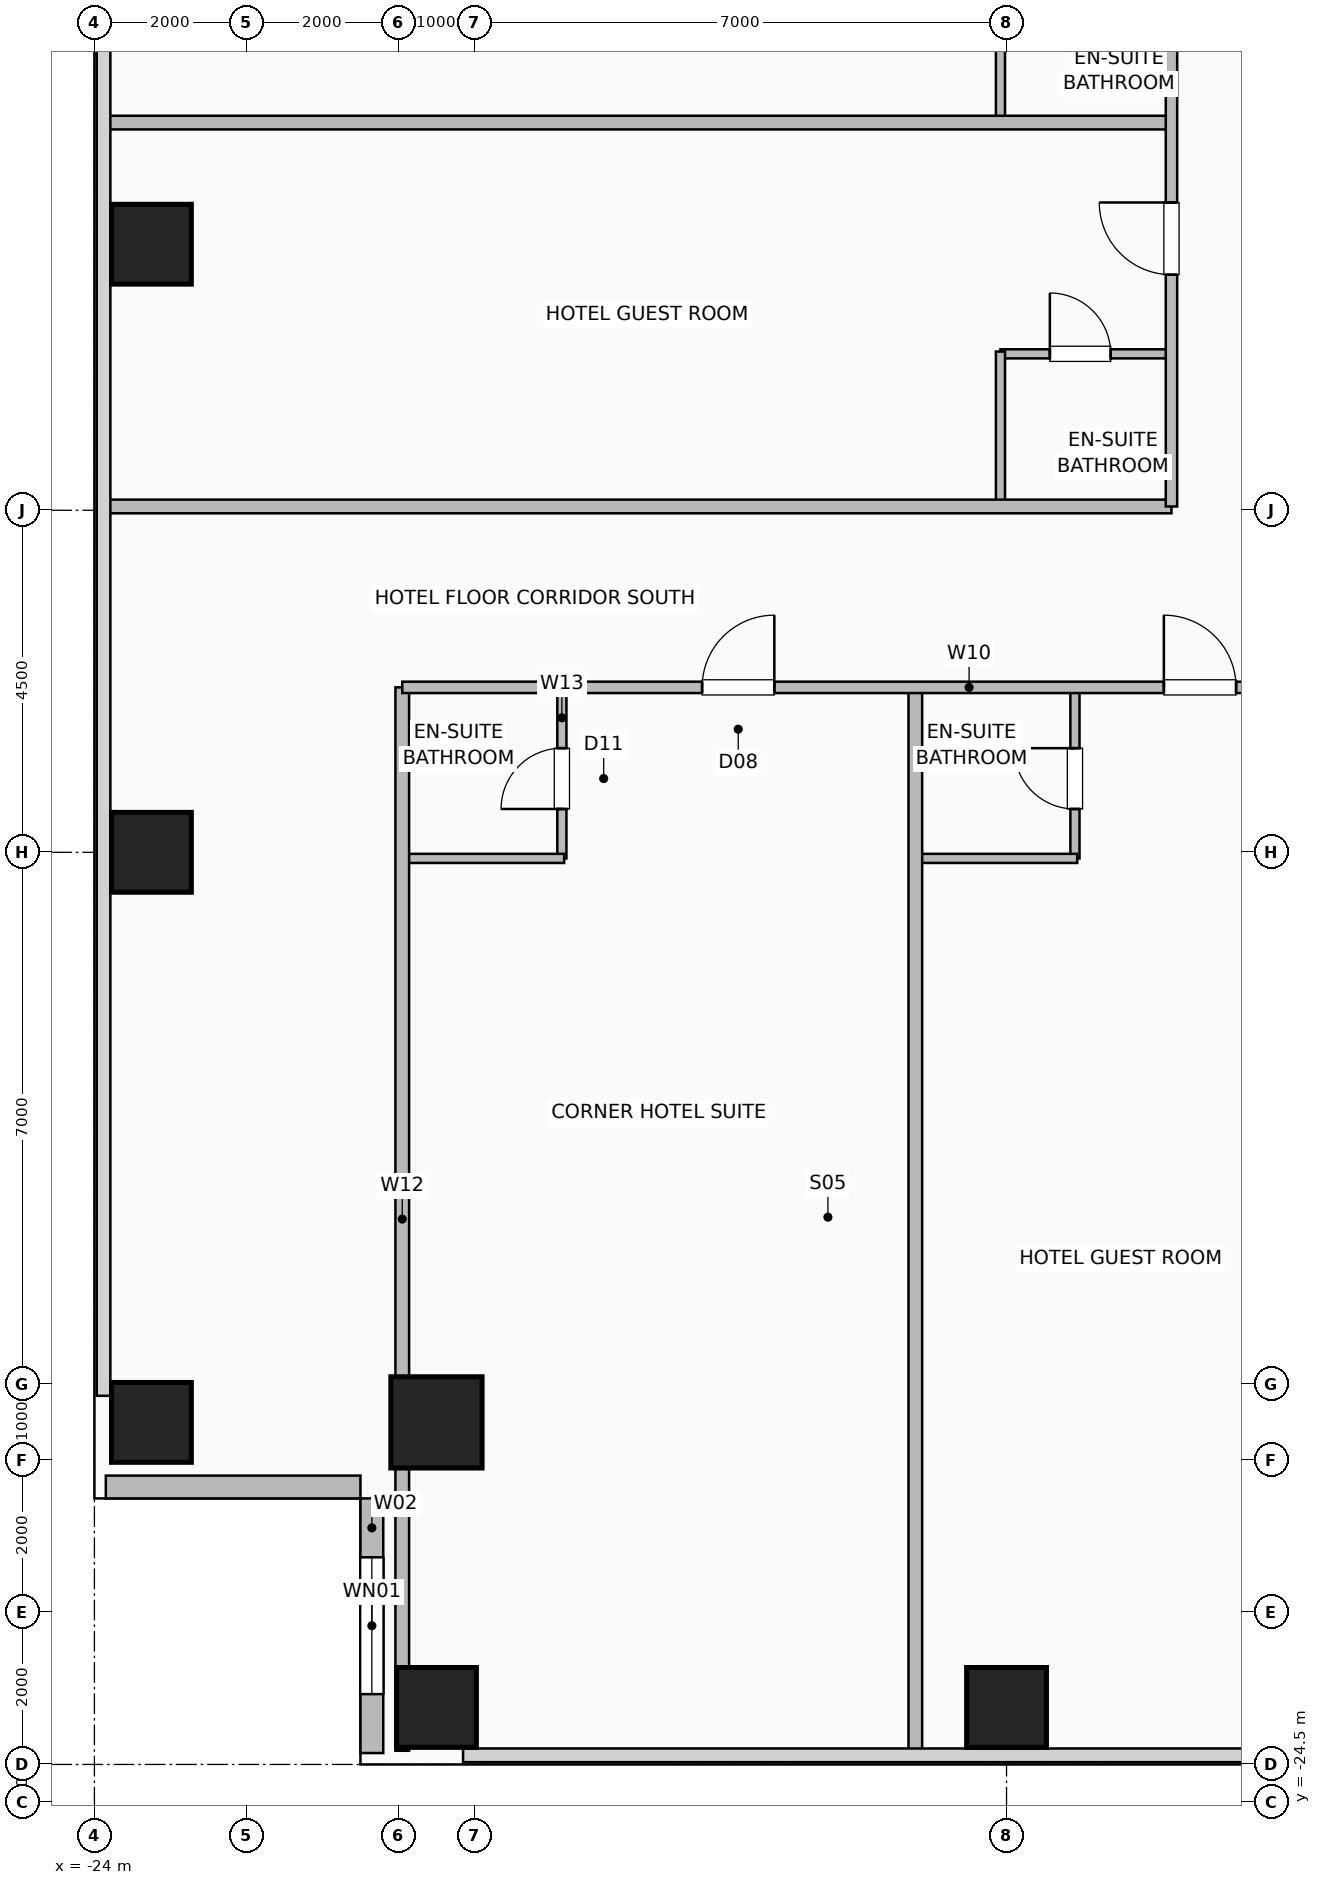
"""IFC4 building model, lengths in metres.
Left out: names, types, materials, properties, quantities, classifications, styles, units other than length and angle.
Written with IfcOpenShell. Run it as: python <this file> out.ifc"""

import sys

from ifc_helpers import new_model, si_unit, direction, frame, frame_2d, origin, origin_2d, place, context, subcontext, project, spatial, rectangle, hollow_rectangle, extrude, element, fill, save


model = new_model("IFC4")
c1 = context("Model", 3, precision=1e-05, world=origin(), true_north=direction((0.0, 1.0)))
c2 = subcontext(c1, "Body", "Model", "MODEL_VIEW")
j1 = project(units=[si_unit("LENGTHUNIT", "METRE"), si_unit("PLANEANGLEUNIT", "RADIAN")], contexts=[c1])
p1 = place(None, origin())
s1 = spatial("IfcSite", under=j1, at=p1, CompositionType="ELEMENT")
p2 = place(p1, origin())
s2 = spatial("IfcBuilding", under=s1, at=p2, CompositionType="ELEMENT")
p3 = place(p2, frame((0.0, 0.0, 30.5)))
s3 = spatial("IfcBuildingStorey", under=s2, at=p3, CompositionType="ELEMENT", Elevation=30.5)
for number, where, z_axis, x_axis in (
    (1, (-19.5, -23.25, 0.0), (0.0, 0.0, 1.0), (1.0, 0.0, 0.0)),
    (2, (-23.25, -19.5, 0.0), (0.0, 0.0, 1.0), (1.0, 0.0, 0.0)),
    (3, (-12.0, -23.25, 0.0), (0.0, 0.0, 1.0), (1.0, 0.0, 0.0)),
    (4, (-23.25, -12.0, 0.0), (0.0, 0.0, 1.0), (1.0, 0.0, 0.0)),
    (5, (-23.25, -4.0, 0.0), (0.0, 0.0, 1.0), (1.0, 0.0, 0.0)),
):
    element("IfcColumn", number, at=place(p3, frame(where, z_axis=z_axis, x_axis=x_axis)), inside=s3, PredefinedType="COLUMN", context=c2, shape_type="SweptSolid", body=[
        extrude(hollow_rectangle(XDim=1.05, YDim=1.05, WallThickness=0.05, at=origin_2d()), origin(), (0.0, 0.0, 1.0), 3.5),
    ])
p4 = place(p3, frame((-19.5, -19.5, 0.0), z_axis=(0.0, 0.0, 1.0), x_axis=(1.0, 0.0, 0.0)))
e6 = element("IfcColumn", 6, at=p4, inside=s3, PredefinedType="COLUMN", context=c2, shape_type="SweptSolid", body=[
    extrude(hollow_rectangle(XDim=1.2, YDim=1.2, WallThickness=0.055, at=origin_2d()), origin(), (0.0, 0.0, 1.0), 3.5),
])
p5 = place(p3, frame((-20.35, -23.85, 0.0), z_axis=(0.0, 0.0, 1.0), x_axis=(0.0, 1.0, 0.0)))
e7 = element("IfcWall", 7, at=p5, inside=s3, PredefinedType="SOLIDWALL", context=c2, shape_type="SweptSolid", body=[
    extrude(rectangle(XDim=3.35, YDim=0.3, at=frame_2d((1.675, 0.0))), origin(), (0.0, 0.0, 1.0), 3.25),
])
p6 = place(p5, frame((0.775, 0.0, 0.9)))
e8 = element("IfcOpeningElement", 8, at=p6, cuts=e7, PredefinedType="OPENING", context=c2, shape_type="SweptSolid", body=[
    extrude(rectangle(XDim=1.8, YDim=1.8, at=frame_2d((0.9, 0.9))), frame((0.0, 0.16, 0.0), z_axis=(0.0, -1.0, 0.0), x_axis=(1.0, 0.0, 0.0)), (0.0, 0.0, 1.0), 0.32),
])
p7 = place(p3, frame((-23.85, -20.35, 0.0), z_axis=(0.0, 0.0, 1.0), x_axis=(1.0, 0.0, 0.0)))
e9 = element("IfcWall", 9, at=p7, inside=s3, PredefinedType="SOLIDWALL", context=c2, shape_type="SweptSolid", body=[
    extrude(rectangle(XDim=3.35, YDim=0.3, at=frame_2d((1.675, 0.0))), origin(), (0.0, 0.0, 1.0), 3.25),
])
p8 = place(p3, frame((-17.85, -12.08, 0.0), z_axis=(0.0, 0.0, 1.0), x_axis=(0.0, 1.0, 0.0)))
e10 = element("IfcWall", 10, at=p8, inside=s3, PredefinedType="PLUMBINGWALL", context=c2, shape_type="SweptSolid", body=[
    extrude(rectangle(XDim=2.25, YDim=0.12, at=frame_2d((1.125, 0.0))), origin(), (0.0, 0.0, 1.0), 3.25),
])
p9 = place(p8, frame((0.65, 0.0, 0.0)))
e11 = element("IfcOpeningElement", 11, at=p9, cuts=e10, PredefinedType="OPENING", context=c2, shape_type="SweptSolid", body=[
    extrude(rectangle(XDim=0.8, YDim=2.05, at=frame_2d((0.4, 1.025))), frame((0.0, 0.07, 0.0), z_axis=(0.0, -1.0, 0.0), x_axis=(1.0, 0.0, 0.0)), (0.0, 0.0, 1.0), 0.14),
])
p10 = place(p3, frame((-19.92, -12.08, 0.0), z_axis=(0.0, 0.0, 1.0), x_axis=(1.0, 0.0, 0.0)))
e12 = element("IfcWall", 12, at=p10, inside=s3, PredefinedType="PLUMBINGWALL", context=c2, shape_type="SweptSolid", body=[
    extrude(rectangle(XDim=2.1, YDim=0.12, at=frame_2d((1.05, 0.0))), origin(), (0.0, 0.0, 1.0), 3.25),
])
p11 = place(p3, frame((-11.1, -12.08, 0.0), z_axis=(0.0, 0.0, 1.0), x_axis=(0.0, 1.0, 0.0)))
e13 = element("IfcWall", 13, at=p11, inside=s3, PredefinedType="PLUMBINGWALL", context=c2, shape_type="SweptSolid", body=[
    extrude(rectangle(XDim=2.25, YDim=0.12, at=frame_2d((1.125, 0.0))), origin(), (0.0, 0.0, 1.0), 3.25),
])
p12 = place(p11, frame((0.65, 0.0, 0.0)))
e14 = element("IfcOpeningElement", 14, at=p12, cuts=e13, PredefinedType="OPENING", context=c2, shape_type="SweptSolid", body=[
    extrude(rectangle(XDim=0.8, YDim=2.05, at=frame_2d((0.4, 1.025))), frame((0.0, 0.07, 0.0), z_axis=(0.0, -1.0, 0.0), x_axis=(1.0, 0.0, 0.0)), (0.0, 0.0, 1.0), 0.14),
])
p13 = place(p3, frame((-13.17, -12.08, 0.0), z_axis=(0.0, 0.0, 1.0), x_axis=(1.0, 0.0, 0.0)))
e15 = element("IfcWall", 15, at=p13, inside=s3, PredefinedType="PLUMBINGWALL", context=c2, shape_type="SweptSolid", body=[
    extrude(rectangle(XDim=2.1, YDim=0.12, at=frame_2d((1.05, 0.0))), origin(), (0.0, 0.0, 1.0), 3.25),
])
for number, where, z_axis, x_axis in (
    (16, (-19.95, -23.82, 0.0), (0.0, 0.0, 1.0), (0.0, 1.0, 0.0)),
    (17, (-13.2, -23.82, 0.0), (0.0, 0.0, 1.0), (0.0, 1.0, 0.0)),
):
    element("IfcWall", number, at=place(p3, frame(where, z_axis=z_axis, x_axis=x_axis)), inside=s3, PredefinedType="PARTITIONING", context=c2, shape_type="SweptSolid", body=[
        extrude(rectangle(XDim=13.99, YDim=0.18, at=frame_2d((6.995, 0.0))), origin(), (0.0, 0.0, 1.0), 3.25),
    ])
p14 = place(p3, frame((-19.95, -9.83, 0.0), z_axis=(0.0, 0.0, 1.0), x_axis=(1.0, 0.0, 0.0)))
e18 = element("IfcWall", 18, at=p14, inside=s3, PredefinedType="PARTITIONING", context=c2, shape_type="SweptSolid", body=[
    extrude(rectangle(XDim=39.9, YDim=0.15, at=frame_2d((19.95, 0.0))), origin(), (0.0, 0.0, 1.0), 3.25),
])
p15 = place(p14, frame((3.945, 0.0, 0.0)))
e19 = element("IfcOpeningElement", 19, at=p15, cuts=e18, PredefinedType="OPENING", context=c2, shape_type="SweptSolid", body=[
    extrude(rectangle(XDim=0.95, YDim=2.08, at=frame_2d((0.475, 1.04))), frame((0.0, 0.085, 0.0), z_axis=(0.0, -1.0, 0.0), x_axis=(1.0, 0.0, 0.0)), (0.0, 0.0, 1.0), 0.17),
])
p16 = place(p14, frame((10.02, 0.0, 0.0)))
e20 = element("IfcOpeningElement", 20, at=p16, cuts=e18, PredefinedType="OPENING", context=c2, shape_type="SweptSolid", body=[
    extrude(rectangle(XDim=0.95, YDim=2.08, at=frame_2d((0.475, 1.04))), frame((0.0, 0.085, 0.0), z_axis=(0.0, -1.0, 0.0), x_axis=(1.0, 0.0, 0.0)), (0.0, 0.0, 1.0), 0.17),
])
p17 = place(p14, frame((15.42, 0.0, 0.0)))
e21 = element("IfcOpeningElement", 21, at=p17, cuts=e18, PredefinedType="OPENING", context=c2, shape_type="SweptSolid", body=[
    extrude(rectangle(XDim=0.95, YDim=2.08, at=frame_2d((0.475, 1.04))), frame((0.0, 0.085, 0.0), z_axis=(0.0, -1.0, 0.0), x_axis=(1.0, 0.0, 0.0)), (0.0, 0.0, 1.0), 0.17),
])
p18 = place(p14, frame((20.702, 0.0, 0.0)))
e22 = element("IfcOpeningElement", 22, at=p18, cuts=e18, PredefinedType="OPENING", context=c2, shape_type="SweptSolid", body=[
    extrude(rectangle(XDim=0.95, YDim=2.08, at=frame_2d((0.475, 1.04))), frame((0.0, 0.085, 0.0), z_axis=(0.0, -1.0, 0.0), x_axis=(1.0, 0.0, 0.0)), (0.0, 0.0, 1.0), 0.17),
])
p19 = place(p14, frame((26.02, 0.0, 0.0)))
e23 = element("IfcOpeningElement", 23, at=p19, cuts=e18, PredefinedType="OPENING", context=c2, shape_type="SweptSolid", body=[
    extrude(rectangle(XDim=0.95, YDim=2.08, at=frame_2d((0.475, 1.04))), frame((0.0, 0.085, 0.0), z_axis=(0.0, -1.0, 0.0), x_axis=(1.0, 0.0, 0.0)), (0.0, 0.0, 1.0), 0.17),
])
p20 = place(p14, frame((31.37, 0.0, 0.0)))
e24 = element("IfcOpeningElement", 24, at=p20, cuts=e18, PredefinedType="OPENING", context=c2, shape_type="SweptSolid", body=[
    extrude(rectangle(XDim=0.95, YDim=2.08, at=frame_2d((0.475, 1.04))), frame((0.0, 0.085, 0.0), z_axis=(0.0, -1.0, 0.0), x_axis=(1.0, 0.0, 0.0)), (0.0, 0.0, 1.0), 0.17),
])
p21 = place(p14, frame((37.245, 0.0, 0.0)))
e25 = element("IfcOpeningElement", 25, at=p21, cuts=e18, PredefinedType="OPENING", context=c2, shape_type="SweptSolid", body=[
    extrude(rectangle(XDim=0.95, YDim=2.08, at=frame_2d((0.475, 1.04))), frame((0.0, 0.085, 0.0), z_axis=(0.0, -1.0, 0.0), x_axis=(1.0, 0.0, 0.0)), (0.0, 0.0, 1.0), 0.17),
])
p22 = place(p3, frame((-12.08, -5.442, 0.0), z_axis=(0.0, 0.0, 1.0), x_axis=(1.0, 0.0, 0.0)))
e26 = element("IfcWall", 26, at=p22, inside=s3, PredefinedType="PLUMBINGWALL", context=c2, shape_type="SweptSolid", body=[
    extrude(rectangle(XDim=2.25, YDim=0.12, at=frame_2d((1.125, 0.0))), origin(), (0.0, 0.0, 1.0), 3.25),
])
p23 = place(p22, frame((0.65, 0.0, 0.0)))
e27 = element("IfcOpeningElement", 27, at=p23, cuts=e26, PredefinedType="OPENING", context=c2, shape_type="SweptSolid", body=[
    extrude(rectangle(XDim=0.8, YDim=2.05, at=frame_2d((0.4, 1.025))), frame((0.0, 0.07, 0.0), z_axis=(0.0, -1.0, 0.0), x_axis=(1.0, 0.0, 0.0)), (0.0, 0.0, 1.0), 0.14),
])
p24 = place(p3, frame((-12.08, -7.42, 0.0), z_axis=(0.0, 0.0, 1.0), x_axis=(0.0, 1.0, 0.0)))
e28 = element("IfcWall", 28, at=p24, inside=s3, PredefinedType="PLUMBINGWALL", context=c2, shape_type="SweptSolid", body=[
    extrude(rectangle(XDim=2.008, YDim=0.12, at=frame_2d((1.004, 0.0))), origin(), (0.0, 0.0, 1.0), 3.25),
])
p25 = place(p3, frame((-12.08, -2.37, 0.0), z_axis=(0.0, 0.0, 1.0), x_axis=(0.0, 1.0, 0.0)))
e29 = element("IfcWall", 29, at=p25, inside=s3, PredefinedType="PLUMBINGWALL", context=c2, shape_type="SweptSolid", body=[
    extrude(rectangle(XDim=1.913, YDim=0.12, at=frame_2d((0.957, 0.0))), origin(), (0.0, 0.0, 1.0), 3.25),
])
for number, where, z_axis, x_axis in (
    (30, (-23.82, -7.45, 0.0), (0.0, 0.0, 1.0), (1.0, 0.0, 0.0)),
    (31, (-23.82, -2.4, 0.0), (0.0, 0.0, 1.0), (1.0, 0.0, 0.0)),
):
    element("IfcWall", number, at=place(p3, frame(where, z_axis=z_axis, x_axis=x_axis)), inside=s3, PredefinedType="PARTITIONING", context=c2, shape_type="SweptSolid", body=[
        extrude(rectangle(XDim=13.99, YDim=0.18, at=frame_2d((6.995, 0.0))), origin(), (0.0, 0.0, 1.0), 3.25),
    ])
p26 = place(p3, frame((-9.83, -7.45, 0.0), z_axis=(0.0, 0.0, 1.0), x_axis=(0.0, 1.0, 0.0)))
e32 = element("IfcWall", 32, at=p26, inside=s3, PredefinedType="PARTITIONING", context=c2, shape_type="SweptSolid", body=[
    extrude(rectangle(XDim=14.9, YDim=0.15, at=frame_2d((7.45, 0.0))), origin(), (0.0, 0.0, 1.0), 3.25),
])
p27 = place(p26, frame((3.049, 0.0, 0.0)))
e33 = element("IfcOpeningElement", 33, at=p27, cuts=e32, PredefinedType="OPENING", context=c2, shape_type="SweptSolid", body=[
    extrude(rectangle(XDim=0.95, YDim=2.08, at=frame_2d((0.475, 1.04))), frame((0.0, 0.085, 0.0), z_axis=(0.0, -1.0, 0.0), x_axis=(1.0, 0.0, 0.0)), (0.0, 0.0, 1.0), 0.17),
])
p28 = place(p26, frame((7.927, 0.0, 0.0)))
e34 = element("IfcOpeningElement", 34, at=p28, cuts=e32, PredefinedType="OPENING", context=c2, shape_type="SweptSolid", body=[
    extrude(rectangle(XDim=0.95, YDim=2.08, at=frame_2d((0.475, 1.04))), frame((0.0, 0.085, 0.0), z_axis=(0.0, -1.0, 0.0), x_axis=(1.0, 0.0, 0.0)), (0.0, 0.0, 1.0), 0.17),
])
p29 = place(p26, frame((12.899, 0.0, 0.0)))
e35 = element("IfcOpeningElement", 35, at=p29, cuts=e32, PredefinedType="OPENING", context=c2, shape_type="SweptSolid", body=[
    extrude(rectangle(XDim=0.95, YDim=2.08, at=frame_2d((0.475, 1.04))), frame((0.0, 0.085, 0.0), z_axis=(0.0, -1.0, 0.0), x_axis=(1.0, 0.0, 0.0)), (0.0, 0.0, 1.0), 0.17),
])
p30 = place(p6, origin())
e36 = element("IfcWindow", 36, at=p30, inside=s3, PartitioningType="SINGLE_PANEL", PredefinedType="WINDOW", context=c2, shape_type="SweptSolid", body=[
    extrude(rectangle(XDim=1.8, YDim=1.8, at=frame_2d((0.9, 0.9))), frame((0.0, 0.03, 0.0), z_axis=(0.0, -1.0, 0.0), x_axis=(1.0, 0.0, 0.0)), (0.0, 0.0, 1.0), 0.06),
])
fill(e8, e36)
p31 = place(p9, origin())
e37 = element("IfcDoor", 37, at=p31, inside=s3, OperationType="SINGLE_SWING_LEFT", PredefinedType="DOOR", context=c2, shape_type="SweptSolid", body=[
    extrude(rectangle(XDim=0.8, YDim=2.05, at=frame_2d((0.4, 1.025))), frame((0.0, 0.025, 0.0), z_axis=(0.0, -1.0, 0.0), x_axis=(1.0, 0.0, 0.0)), (0.0, 0.0, 1.0), 0.05),
])
fill(e11, e37)
p32 = place(p12, origin())
e38 = element("IfcDoor", 38, at=p32, inside=s3, OperationType="SINGLE_SWING_RIGHT", PredefinedType="DOOR", context=c2, shape_type="SweptSolid", body=[
    extrude(rectangle(XDim=0.8, YDim=2.05, at=frame_2d((0.4, 1.025))), frame((0.0, 0.025, 0.0), z_axis=(0.0, -1.0, 0.0), x_axis=(1.0, 0.0, 0.0)), (0.0, 0.0, 1.0), 0.05),
])
fill(e14, e38)
p33 = place(p15, origin())
e39 = element("IfcDoor", 39, at=p33, inside=s3, OperationType="SINGLE_SWING_RIGHT", PredefinedType="DOOR", context=c2, shape_type="SweptSolid", body=[
    extrude(rectangle(XDim=0.95, YDim=2.08, at=frame_2d((0.475, 1.04))), frame((0.0, 0.025, 0.0), z_axis=(0.0, -1.0, 0.0), x_axis=(1.0, 0.0, 0.0)), (0.0, 0.0, 1.0), 0.05),
])
fill(e19, e39)
p34 = place(p16, origin())
e40 = element("IfcDoor", 40, at=p34, inside=s3, OperationType="SINGLE_SWING_LEFT", PredefinedType="DOOR", context=c2, shape_type="SweptSolid", body=[
    extrude(rectangle(XDim=0.95, YDim=2.08, at=frame_2d((0.475, 1.04))), frame((0.0, 0.025, 0.0), z_axis=(0.0, -1.0, 0.0), x_axis=(1.0, 0.0, 0.0)), (0.0, 0.0, 1.0), 0.05),
])
fill(e20, e40)
p35 = place(p23, origin())
e41 = element("IfcDoor", 41, at=p35, inside=s3, OperationType="SINGLE_SWING_LEFT", PredefinedType="DOOR", context=c2, shape_type="SweptSolid", body=[
    extrude(rectangle(XDim=0.8, YDim=2.05, at=frame_2d((0.4, 1.025))), frame((0.0, 0.025, 0.0), z_axis=(0.0, -1.0, 0.0), x_axis=(1.0, 0.0, 0.0)), (0.0, 0.0, 1.0), 0.05),
])
fill(e27, e41)
p36 = place(p27, origin())
e42 = element("IfcDoor", 42, at=p36, inside=s3, OperationType="SINGLE_SWING_RIGHT", PredefinedType="DOOR", context=c2, shape_type="SweptSolid", body=[
    extrude(rectangle(XDim=0.95, YDim=2.08, at=frame_2d((0.475, 1.04))), frame((0.0, 0.025, 0.0), z_axis=(0.0, -1.0, 0.0), x_axis=(1.0, 0.0, 0.0)), (0.0, 0.0, 1.0), 0.05),
])
fill(e33, e42)
save(model, sys.argv[1])
